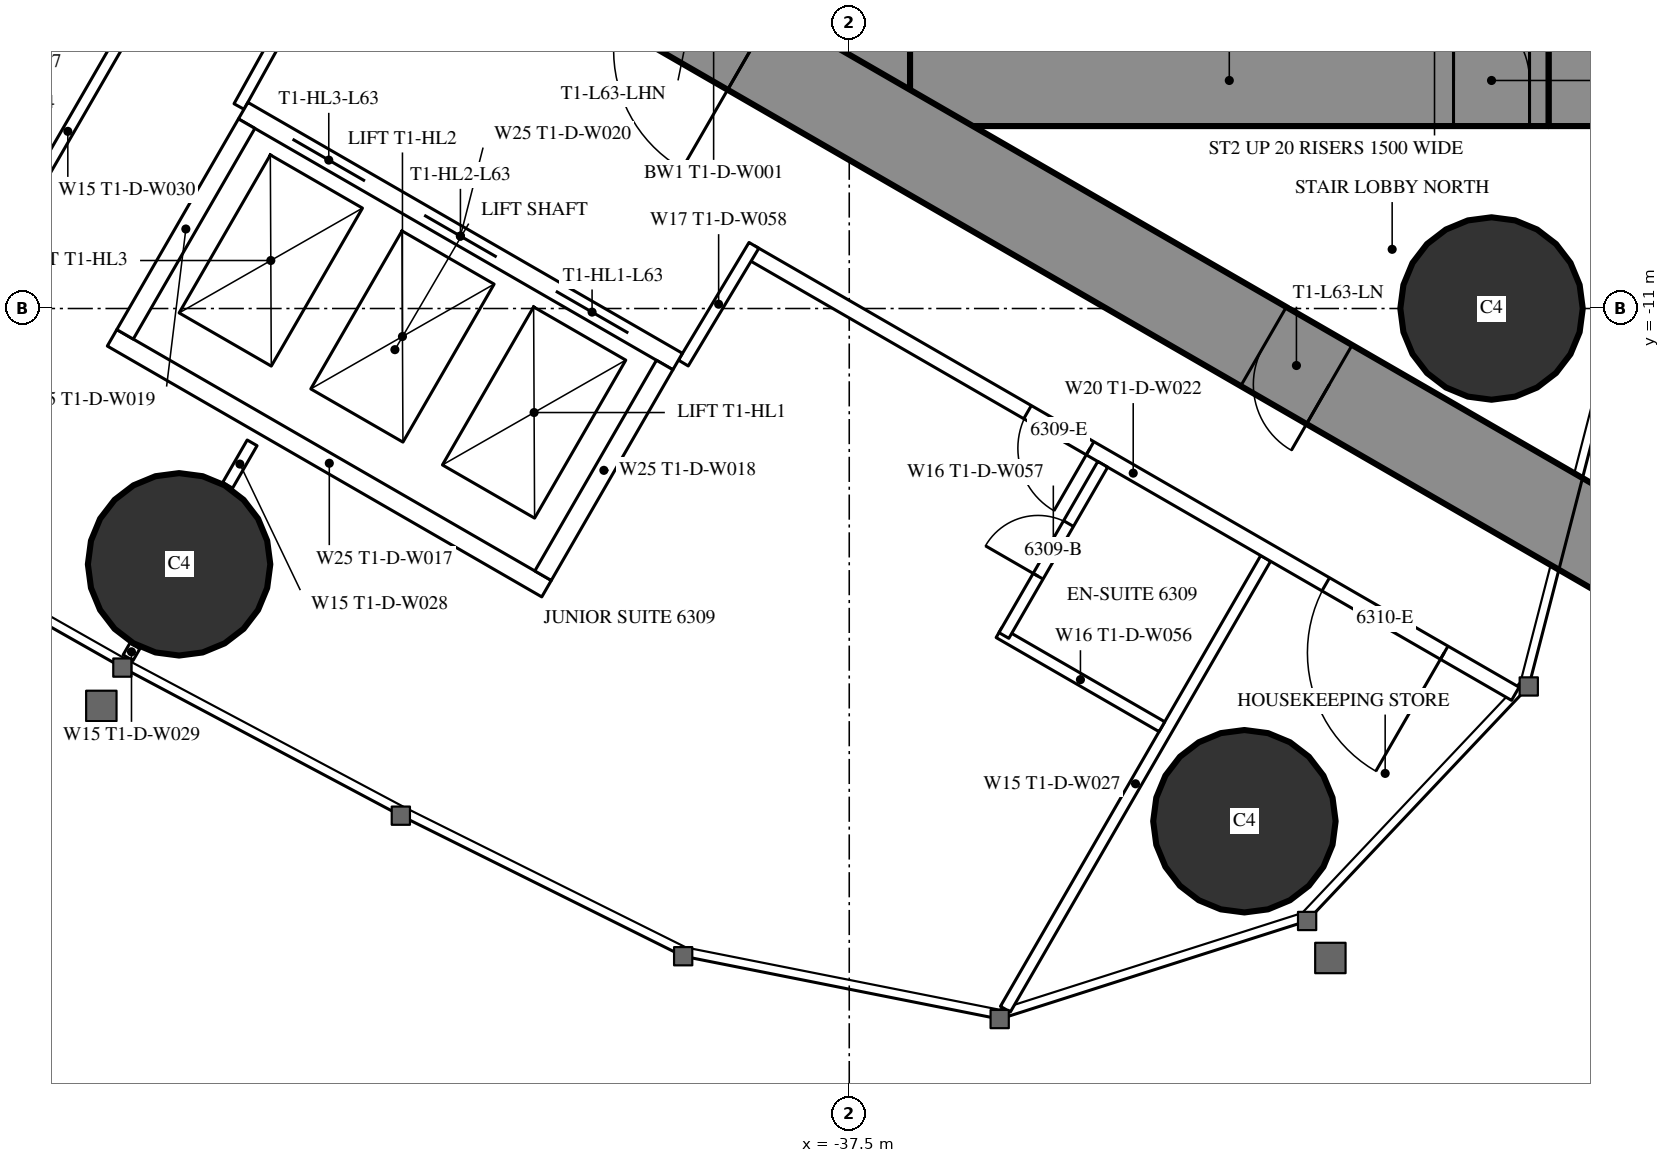
"""IFC4 building model, lengths in metres.
Left out: names, types, materials, properties, quantities, classifications, styles, units other than length and angle.
Written with IfcOpenShell. Run it as: python <this file> out.ifc"""

import sys

from ifc_helpers import new_model, si_unit, direction, frame, frame_2d, origin, origin_2d, place, context, subcontext, project, spatial, rectangle, circle, extrude, element, fill, save


model = new_model("IFC4")
c1 = context("Model", 3, precision=1e-05, world=origin(), true_north=direction((0.0, 1.0)))
c2 = subcontext(c1, "Body", "Model", "MODEL_VIEW")
j1 = project(units=[si_unit("LENGTHUNIT", "METRE"), si_unit("PLANEANGLEUNIT", "RADIAN")], contexts=[c1])
p1 = place(None, origin())
s1 = spatial("IfcSite", under=j1, at=p1, CompositionType="ELEMENT")
p2 = place(p1, origin())
s2 = spatial("IfcBuilding", under=s1, at=p2, CompositionType="ELEMENT")
p3 = place(p2, frame((0.0, 0.0, 236.9)))
s3 = spatial("IfcBuildingStorey", under=s2, at=p3, CompositionType="ELEMENT", Elevation=236.9)
for number, where, z_axis, x_axis in (
    (1, (-32.301, -17.745, 0.0), (0.0, 0.0, 1.0), (1.0, 0.0, 0.0)),
    (2, (-29.05, -11.0, 0.0), (0.0, 0.0, 1.0), (1.0, 0.0, 0.0)),
    (3, (-46.317, -14.365, 0.0), (0.0, 0.0, 1.0), (1.0, 0.0, 0.0)),
):
    element("IfcColumn", number, at=place(p3, frame(where, z_axis=z_axis, x_axis=x_axis)), inside=s3, PredefinedType="COLUMN", context=c2, shape_type="SweptSolid", body=[
        extrude(circle(Radius=1.2, at=origin_2d()), origin(), (0.0, 0.0, 1.0), 3.6),
    ])
p4 = place(p3, frame((-27.9, 8.6, 0.0), z_axis=(0.0, 0.0, 1.0), x_axis=(0.0, -1.0, 0.0)))
e4 = element("IfcWall", 4, at=p4, inside=s3, PredefinedType="SHEAR", context=c2, shape_type="SweptSolid", body=[
    extrude(rectangle(XDim=17.2, YDim=0.8, at=frame_2d((8.6, 0.0))), origin(), (0.0, 0.0, 1.0), 3.6),
])
p5 = place(p4, frame((6.95, 0.0, 0.0)))
e5 = element("IfcOpeningElement", 5, at=p5, cuts=e4, PredefinedType="OPENING", context=c2, shape_type="SweptSolid", body=[
    extrude(rectangle(XDim=0.9, YDim=2.2, at=frame_2d((0.45, 1.1))), frame((0.0, 0.41, 0.0), z_axis=(0.0, -1.0, 0.0), x_axis=(1.0, 0.0, 0.0)), (0.0, 0.0, 1.0), 0.82),
])
p6 = place(p3, frame((-37.3, 8.6, 0.0), z_axis=(0.0, 0.0, 1.0), x_axis=(0.0, -1.0, 0.0)))
e6 = element("IfcWall", 6, at=p6, inside=s3, PredefinedType="SHEAR", context=c2, shape_type="SweptSolid", body=[
    extrude(rectangle(XDim=17.2, YDim=1.2, at=frame_2d((8.6, 0.0))), origin(), (0.0, 0.0, 1.0), 3.6),
])
p7 = place(p6, frame((7.7, 0.0, 0.0)))
e7 = element("IfcOpeningElement", 7, at=p7, cuts=e6, PredefinedType="OPENING", context=c2, shape_type="SweptSolid", body=[
    extrude(rectangle(XDim=1.8, YDim=2.2, at=frame_2d((0.9, 1.1))), frame((0.0, 0.61, 0.0), z_axis=(0.0, -1.0, 0.0), x_axis=(1.0, 0.0, 0.0)), (0.0, 0.0, 1.0), 1.22),
])
p8 = place(p3, frame((-28.3, -8.0, 0.0), z_axis=(0.0, 0.0, 1.0), x_axis=(-1.0, 0.0, 0.0)))
e8 = element("IfcWall", 8, at=p8, inside=s3, PredefinedType="SHEAR", context=c2, shape_type="SweptSolid", body=[
    extrude(rectangle(XDim=8.4, YDim=1.2, at=frame_2d((4.2, 0.0))), origin(), (0.0, 0.0, 1.0), 3.6),
])
p9 = place(p8, frame((0.25, 0.0, 0.0)))
e9 = element("IfcOpeningElement", 9, at=p9, cuts=e8, PredefinedType="OPENING", context=c2, shape_type="SweptSolid", body=[
    extrude(rectangle(XDim=1.0, YDim=2.2, at=frame_2d((0.5, 1.1))), frame((0.0, 0.61, 0.0), z_axis=(0.0, -1.0, 0.0), x_axis=(1.0, 0.0, 0.0)), (0.0, 0.0, 1.0), 1.22),
])
p10 = place(p3, frame((-27.2, -14.3, 0.0), z_axis=(0.0, 0.0, 1.0), x_axis=(-0.866024021859, 0.500002393557, 0.0)))
e10 = element("IfcWall", 10, at=p10, inside=s3, PredefinedType="SHEAR", context=c2, shape_type="SweptSolid", body=[
    extrude(rectangle(XDim=27.907, YDim=1.2, at=frame_2d((13.954, 0.0))), origin(), (0.0, 0.0, 1.0), 3.6),
])
p11 = place(p10, frame((4.6, 0.0, 0.0)))
e11 = element("IfcOpeningElement", 11, at=p11, cuts=e10, PredefinedType="OPENING", context=c2, shape_type="SweptSolid", body=[
    extrude(rectangle(XDim=1.0, YDim=2.2, at=frame_2d((0.5, 1.1))), frame((0.0, 0.61, 0.0), z_axis=(0.0, -1.0, 0.0), x_axis=(1.0, 0.0, 0.0)), (0.0, 0.0, 1.0), 1.22),
])
p12 = place(p10, frame((13.395, 0.0, 0.0)))
e12 = element("IfcOpeningElement", 12, at=p12, cuts=e10, PredefinedType="OPENING", context=c2, shape_type="SweptSolid", body=[
    extrude(rectangle(XDim=1.8, YDim=2.2, at=frame_2d((0.9, 1.1))), frame((0.0, 0.61, 0.0), z_axis=(0.0, -1.0, 0.0), x_axis=(1.0, 0.0, 0.0)), (0.0, 0.0, 1.0), 1.22),
])
p13 = place(p3, frame((-32.022, -14.287, 0.0), z_axis=(0.0, 0.0, 1.0), x_axis=(-0.50000019414, -0.866025291697, 0.0)))
e13 = element("IfcWall", 13, at=p13, inside=s3, PredefinedType="PARTITIONING", context=c2, shape_type="SweptSolid", body=[
    extrude(rectangle(XDim=6.848, YDim=0.15, at=frame_2d((3.424, 0.0))), origin(), (0.0, 0.0, 1.0), 3.35),
])
p14 = place(p3, frame((-46.898, -15.439, 0.0), z_axis=(0.0, 0.0, 1.0), x_axis=(-0.500232303069, -0.865891241997, 0.0)))
e14 = element("IfcWall", 14, at=p14, inside=s3, PredefinedType="PARTITIONING", context=c2, shape_type="SweptSolid", body=[
    extrude(rectangle(XDim=0.18, YDim=0.15, at=frame_2d((0.09, 0.0))), origin(), (0.0, 0.0, 1.0), 2.45),
])
p15 = place(p3, frame((-46.274, -6.059, 0.0), z_axis=(0.0, 0.0, 1.0), x_axis=(-0.500020471368, -0.866013584312, 0.0)))
e15 = element("IfcWall", 15, at=p15, inside=s3, PredefinedType="PARTITIONING", context=c2, shape_type="SweptSolid", body=[
    extrude(rectangle(XDim=6.028, YDim=0.15, at=frame_2d((3.014, 0.0))), origin(), (0.0, 0.0, 1.0), 2.45),
])
p16 = place(p3, frame((-45.356, -12.767, 0.0), z_axis=(0.0, 0.0, 1.0), x_axis=(-0.499886366516, -0.866091000168, 0.0)))
e16 = element("IfcWall", 16, at=p16, inside=s3, PredefinedType="PARTITIONING", context=c2, shape_type="SweptSolid", body=[
    extrude(rectangle(XDim=0.645, YDim=0.15, at=frame_2d((0.322, 0.0))), origin(), (0.0, 0.0, 1.0), 3.35),
])
p17 = place(p3, frame((-28.737, -16.068, 0.0), z_axis=(0.0, 0.0, 1.0), x_axis=(-0.866029399323, 0.49999307946, 0.0)))
e17 = element("IfcWall", 17, at=p17, inside=s3, PredefinedType="PARTITIONING", context=c2, shape_type="SweptSolid", body=[
    extrude(rectangle(XDim=11.61, YDim=0.2, at=frame_2d((5.805, 0.0))), origin(), (0.0, 0.0, 1.0), 3.35),
])
p18 = place(p17, frame((1.08, 0.0, 0.0)))
e18 = element("IfcOpeningElement", 18, at=p18, cuts=e17, PredefinedType="OPENING", context=c2, shape_type="SweptSolid", body=[
    extrude(rectangle(XDim=1.8, YDim=2.03, at=frame_2d((0.9, 1.015))), frame((0.0, 0.11, 0.0), z_axis=(0.0, -1.0, 0.0), x_axis=(1.0, 0.0, 0.0)), (0.0, 0.0, 1.0), 0.22),
])
p19 = place(p17, frame((6.46, 0.0, 0.0)))
e19 = element("IfcOpeningElement", 19, at=p19, cuts=e17, PredefinedType="OPENING", context=c2, shape_type="SweptSolid", body=[
    extrude(rectangle(XDim=0.95, YDim=2.2, at=frame_2d((0.475, 1.1))), frame((0.0, 0.11, 0.0), z_axis=(0.0, -1.0, 0.0), x_axis=(1.0, 0.0, 0.0)), (0.0, 0.0, 1.0), 0.22),
])
for number, where, z_axis, x_axis in (
    (20, (-39.683, -11.718, 0.0), (0.0, 0.0, 1.0), (0.514, 0.858, 0.0)),
    (21, (-44.652, -6.764, 0.0), (0.0, 0.0, 1.0), (-0.485, -0.874, 0.0)),
):
    element("IfcWall", number, at=place(p3, frame(where, z_axis=z_axis, x_axis=x_axis)), inside=s3, PredefinedType="PARTITIONING", context=c2, shape_type="SweptSolid", body=[
        extrude(rectangle(XDim=1.805, YDim=0.15, at=frame_2d((0.903, 0.0))), origin(), (0.0, 0.0, 1.0), 3.35),
    ])
p20 = place(p3, frame((-33.387, -16.502, 0.0), z_axis=(0.0, 0.0, 1.0), x_axis=(-0.866006523861, 0.500032699561, 0.0)))
e22 = element("IfcWall", 22, at=p20, inside=s3, PredefinedType="PARTITIONING", context=c2, shape_type="SweptSolid", body=[
    extrude(rectangle(XDim=2.475, YDim=0.15, at=frame_2d((1.237, 0.0))), origin(), (0.0, 0.0, 1.0), 3.35),
])
p21 = place(p3, frame((-34.165, -13.05, 0.0), z_axis=(0.0, 0.0, 1.0), x_axis=(-0.500047596559, -0.865997922154, 0.0)))
e23 = element("IfcWall", 23, at=p21, inside=s3, PredefinedType="PARTITIONING", context=c2, shape_type="SweptSolid", body=[
    extrude(rectangle(XDim=2.6, YDim=0.15, at=frame_2d((1.3, 0.0))), origin(), (0.0, 0.0, 1.0), 3.35),
])
p22 = place(p21, frame((0.9, 0.0, 0.0)))
e24 = element("IfcOpeningElement", 24, at=p22, cuts=e23, PredefinedType="OPENING", context=c2, shape_type="SweptSolid", body=[
    extrude(rectangle(XDim=0.8, YDim=2.2, at=frame_2d((0.4, 1.1))), frame((0.0, 0.085, 0.0), z_axis=(0.0, -1.0, 0.0), x_axis=(1.0, 0.0, 0.0)), (0.0, 0.0, 1.0), 0.17),
])
p23 = place(p3, frame((-39.758, -11.697, 0.0), z_axis=(0.0, 0.0, 1.0), x_axis=(-0.866024194504, 0.500002094529, 0.0)))
e25 = element("IfcWall", 25, at=p23, inside=s3, PredefinedType="PARTITIONING", context=c2, shape_type="SweptSolid", body=[
    extrude(rectangle(XDim=6.6, YDim=0.25, at=frame_2d((3.3, 0.0))), origin(), (0.0, 0.0, 1.0), 3.35),
])
p24 = place(p23, frame((0.75, 0.0, 0.0)))
e26 = element("IfcOpeningElement", 26, at=p24, cuts=e25, PredefinedType="OPENING", context=c2, shape_type="SweptSolid", body=[
    extrude(rectangle(XDim=1.1, YDim=2.2, at=frame_2d((0.55, 1.1))), frame((0.0, 0.135, 0.0), z_axis=(0.0, -1.0, 0.0), x_axis=(1.0, 0.0, 0.0)), (0.0, 0.0, 1.0), 0.27),
])
p25 = place(p23, frame((2.75, 0.0, 0.0)))
e27 = element("IfcOpeningElement", 27, at=p25, cuts=e25, PredefinedType="OPENING", context=c2, shape_type="SweptSolid", body=[
    extrude(rectangle(XDim=1.1, YDim=2.2, at=frame_2d((0.55, 1.1))), frame((0.0, 0.135, 0.0), z_axis=(0.0, -1.0, 0.0), x_axis=(1.0, 0.0, 0.0)), (0.0, 0.0, 1.0), 0.27),
])
p26 = place(p23, frame((4.75, 0.0, 0.0)))
e28 = element("IfcOpeningElement", 28, at=p26, cuts=e25, PredefinedType="OPENING", context=c2, shape_type="SweptSolid", body=[
    extrude(rectangle(XDim=1.1, YDim=2.2, at=frame_2d((0.55, 1.1))), frame((0.0, 0.135, 0.0), z_axis=(0.0, -1.0, 0.0), x_axis=(1.0, 0.0, 0.0)), (0.0, 0.0, 1.0), 0.27),
])
p27 = place(p3, frame((-41.482, -14.686, 0.0), z_axis=(0.0, 0.0, 1.0), x_axis=(-0.86603344179, 0.499986077507, 0.0)))
e29 = element("IfcWall", 29, at=p27, inside=s3, PredefinedType="PARTITIONING", context=c2, shape_type="SweptSolid", body=[
    extrude(rectangle(XDim=6.6, YDim=0.25, at=frame_2d((3.3, 0.0))), origin(), (0.0, 0.0, 1.0), 3.35),
])
for number, where, z_axis, x_axis in (
    (30, (-39.928, -11.743, 0.0), (0.0, 0.0, 1.0), (-0.5, -0.866, 0.0)),
    (31, (-45.428, -8.568, 0.0), (0.0, 0.0, 1.0), (-0.5, -0.866, 0.0)),
):
    element("IfcWall", number, at=place(p3, frame(where, z_axis=z_axis, x_axis=x_axis)), inside=s3, PredefinedType="PARTITIONING", context=c2, shape_type="SweptSolid", body=[
        extrude(rectangle(XDim=3.201, YDim=0.25, at=frame_2d((1.6, 0.0))), origin(), (0.0, 0.0, 1.0), 3.35),
    ])
p28 = place(p18, origin())
e32 = element("IfcDoor", 32, at=p28, inside=s3, OperationType="DOUBLE_DOOR_SINGLE_SWING", PredefinedType="DOOR", context=c2, shape_type="SweptSolid", body=[
    extrude(rectangle(XDim=1.8, YDim=2.03, at=frame_2d((0.9, 1.015))), frame((0.0, 0.025, 0.0), z_axis=(0.0, -1.0, 0.0), x_axis=(1.0, 0.0, 0.0)), (0.0, 0.0, 1.0), 0.05),
])
fill(e18, e32)
p29 = place(p22, origin())
e33 = element("IfcDoor", 33, at=p29, inside=s3, OperationType="SINGLE_SWING_RIGHT", PredefinedType="DOOR", context=c2, shape_type="SweptSolid", body=[
    extrude(rectangle(XDim=0.8, YDim=2.2, at=frame_2d((0.4, 1.1))), frame((0.0, 0.025, 0.0), z_axis=(0.0, -1.0, 0.0), x_axis=(1.0, 0.0, 0.0)), (0.0, 0.0, 1.0), 0.05),
])
fill(e24, e33)
p30 = place(p19, origin())
e34 = element("IfcDoor", 34, at=p30, inside=s3, OperationType="SINGLE_SWING_LEFT", PredefinedType="DOOR", context=c2, shape_type="SweptSolid", body=[
    extrude(rectangle(XDim=0.95, YDim=2.2, at=frame_2d((0.475, 1.1))), frame((0.0, 0.025, 0.0), z_axis=(0.0, -1.0, 0.0), x_axis=(1.0, 0.0, 0.0)), (0.0, 0.0, 1.0), 0.05),
])
fill(e19, e34)
p31 = place(p11, origin())
e35 = element("IfcDoor", 35, at=p31, inside=s3, OperationType="SINGLE_SWING_LEFT", PredefinedType="DOOR", context=c2, shape_type="SweptSolid", body=[
    extrude(rectangle(XDim=1.0, YDim=2.2, at=frame_2d((0.5, 1.1))), frame((0.0, 0.025, 0.0), z_axis=(0.0, -1.0, 0.0), x_axis=(1.0, 0.0, 0.0)), (0.0, 0.0, 1.0), 0.05),
])
fill(e11, e35)
p32 = place(p9, origin())
e36 = element("IfcDoor", 36, at=p32, inside=s3, OperationType="SINGLE_SWING_RIGHT", PredefinedType="DOOR", context=c2, shape_type="SweptSolid", body=[
    extrude(rectangle(XDim=1.0, YDim=2.2, at=frame_2d((0.5, 1.1))), frame((0.0, 0.025, 0.0), z_axis=(0.0, -1.0, 0.0), x_axis=(1.0, 0.0, 0.0)), (0.0, 0.0, 1.0), 0.05),
])
fill(e9, e36)
p33 = place(p24, origin())
e37 = element("IfcDoor", 37, at=p33, inside=s3, OperationType="DOUBLE_DOOR_SLIDING", PredefinedType="USERDEFINED", context=c2, shape_type="SweptSolid", body=[
    extrude(rectangle(XDim=1.1, YDim=2.2, at=frame_2d((0.55, 1.1))), frame((0.0, 0.025, 0.0), z_axis=(0.0, -1.0, 0.0), x_axis=(1.0, 0.0, 0.0)), (0.0, 0.0, 1.0), 0.05),
])
fill(e26, e37)
p34 = place(p25, origin())
e38 = element("IfcDoor", 38, at=p34, inside=s3, OperationType="DOUBLE_DOOR_SLIDING", PredefinedType="USERDEFINED", context=c2, shape_type="SweptSolid", body=[
    extrude(rectangle(XDim=1.1, YDim=2.2, at=frame_2d((0.55, 1.1))), frame((0.0, 0.025, 0.0), z_axis=(0.0, -1.0, 0.0), x_axis=(1.0, 0.0, 0.0)), (0.0, 0.0, 1.0), 0.05),
])
fill(e27, e38)
p35 = place(p26, origin())
e39 = element("IfcDoor", 39, at=p35, inside=s3, OperationType="DOUBLE_DOOR_SLIDING", PredefinedType="USERDEFINED", context=c2, shape_type="SweptSolid", body=[
    extrude(rectangle(XDim=1.1, YDim=2.2, at=frame_2d((0.55, 1.1))), frame((0.0, 0.025, 0.0), z_axis=(0.0, -1.0, 0.0), x_axis=(1.0, 0.0, 0.0)), (0.0, 0.0, 1.0), 0.05),
])
fill(e28, e39)
save(model, sys.argv[1])
